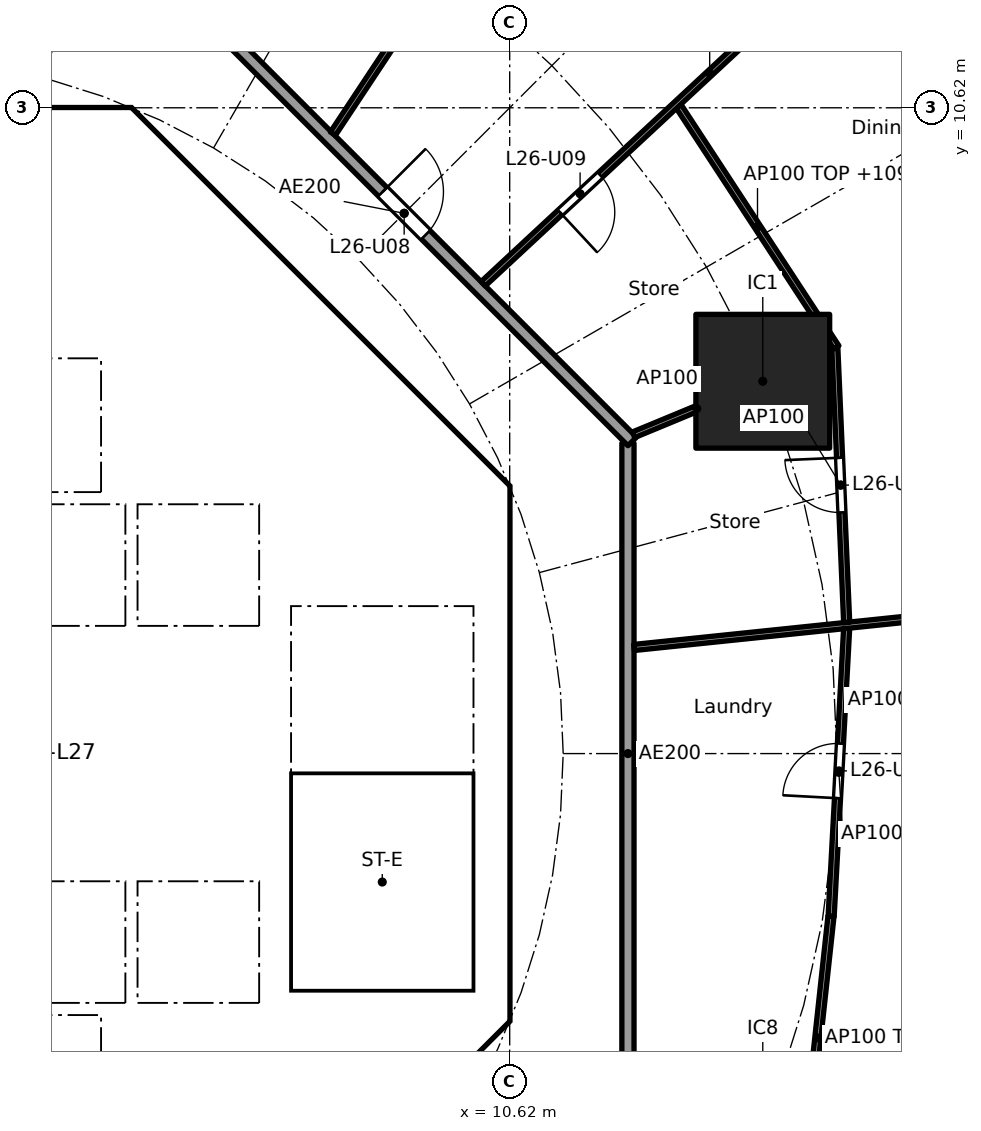
"""IFC4 building model, lengths in metres.
Left out: names, types, materials, properties, quantities, classifications, styles, units other than length and angle.
Written with IfcOpenShell. Run it as: python <this file> out.ifc"""

import sys

from ifc_helpers import new_model, si_unit, direction, frame, frame_2d, origin, origin_2d, place, context, subcontext, project, spatial, polyline, rectangle, outline, extrude, element, fill, save


model = new_model("IFC4")
c1 = context("Model", 3, precision=1e-05, world=origin(), true_north=direction((0.0, 1.0)))
c2 = subcontext(c1, "Body", "Model", "MODEL_VIEW")
j1 = project(units=[si_unit("LENGTHUNIT", "METRE"), si_unit("PLANEANGLEUNIT", "RADIAN")], contexts=[c1])
p1 = place(None, origin())
s1 = spatial("IfcSite", under=j1, at=p1, CompositionType="ELEMENT")
p2 = place(p1, origin())
s2 = spatial("IfcBuilding", under=s1, at=p2, CompositionType="ELEMENT")
p3 = place(p2, frame((0.0, 0.0, 106.6)))
s3 = spatial("IfcBuildingStorey", under=s2, at=p3, CompositionType="ELEMENT", Elevation=106.6)
p4 = place(p3, frame((14.782, 6.123, 0.0), z_axis=(0.0, 0.0, 1.0), x_axis=(1.0, 0.0, 0.0)))
e1 = element("IfcColumn", 1, at=p4, inside=s3, PredefinedType="COLUMN", context=c2, shape_type="SweptSolid", body=[
    extrude(rectangle(XDim=2.2, YDim=2.2, at=origin_2d()), origin(), (0.0, 0.0, 1.0), 3.7),
])
p5 = place(p3, frame((9.988, 4.613, 0.0), z_axis=(0.0, 0.0, 1.0), x_axis=(-0.707106781187, 0.707106781187, 0.0)))
e2 = element("IfcWall", 2, at=p5, inside=s3, PredefinedType="SHEAR", context=c2, shape_type="SweptSolid", body=[
    extrude(rectangle(XDim=7.602, YDim=0.6, at=frame_2d((3.801, 0.0))), origin(), (0.0, 0.0, 1.0), 3.44),
])
p6 = place(p5, frame((3.201, 0.0, 0.0)))
e3 = element("IfcOpeningElement", 3, at=p6, cuts=e2, PredefinedType="OPENING", context=c2, shape_type="SweptSolid", body=[
    extrude(rectangle(XDim=1.2, YDim=2.1, at=frame_2d((0.6, 1.05))), frame((0.0, 0.31, 0.0), z_axis=(0.0, -1.0, 0.0), x_axis=(1.0, 0.0, 0.0)), (0.0, 0.0, 1.0), 0.62),
])
p7 = place(p3, frame((4.613, -9.988, 0.0), z_axis=(0.0, 0.0, 1.0), x_axis=(0.707106781187, 0.707106781187, 0.0)))
e4 = element("IfcWall", 4, at=p7, inside=s3, PredefinedType="SHEAR", context=c2, shape_type="SweptSolid", body=[
    extrude(rectangle(XDim=7.602, YDim=0.6, at=frame_2d((3.801, 0.0))), origin(), (0.0, 0.0, 1.0), 3.44),
])
p8 = place(p7, frame((3.201, 0.0, 0.0)))
e5 = element("IfcOpeningElement", 5, at=p8, cuts=e4, PredefinedType="OPENING", context=c2, shape_type="SweptSolid", body=[
    extrude(rectangle(XDim=1.2, YDim=2.1, at=frame_2d((0.6, 1.05))), frame((0.0, 0.31, 0.0), z_axis=(0.0, -1.0, 0.0), x_axis=(1.0, 0.0, 0.0)), (0.0, 0.0, 1.0), 0.62),
])
p9 = place(p3, frame((4.0, 4.3, 0.0), z_axis=(0.0, 0.0, 1.0), x_axis=(0.0, 1.0, 0.0)))
e6 = element("IfcWall", 6, at=p9, inside=s3, PredefinedType="SOLIDWALL", context=c2, shape_type="SweptSolid", body=[
    extrude(rectangle(XDim=2.2, YDim=0.2, at=frame_2d((1.1, 0.0))), origin(), (0.0, 0.0, 1.0), 3.44),
])
p10 = place(p9, frame((0.55, 0.0, 0.0)))
e7 = element("IfcOpeningElement", 7, at=p10, cuts=e6, PredefinedType="OPENING", context=c2, shape_type="SweptSolid", body=[
    extrude(rectangle(XDim=1.1, YDim=2.1, at=frame_2d((0.55, 1.05))), frame((0.0, 0.11, 0.0), z_axis=(0.0, -1.0, 0.0), x_axis=(1.0, 0.0, 0.0)), (0.0, 0.0, 1.0), 0.22),
])
p11 = place(p3, frame((-6.7, 2.0, 0.0), z_axis=(0.0, 0.0, 1.0), x_axis=(1.0, 0.0, 0.0)))
e8 = element("IfcWall", 8, at=p11, inside=s3, PredefinedType="SOLIDWALL", context=c2, shape_type="SweptSolid", body=[
    extrude(rectangle(XDim=13.4, YDim=0.2, at=frame_2d((6.7, 0.0))), origin(), (0.0, 0.0, 1.0), 3.44),
])
p12 = place(p11, frame((0.65, 0.0, 0.0)))
e9 = element("IfcOpeningElement", 9, at=p12, cuts=e8, PredefinedType="OPENING", context=c2, shape_type="SweptSolid", body=[
    extrude(rectangle(XDim=1.1, YDim=2.1, at=frame_2d((0.55, 1.05))), frame((0.0, 0.11, 0.0), z_axis=(0.0, -1.0, 0.0), x_axis=(1.0, 0.0, 0.0)), (0.0, 0.0, 1.0), 0.22),
])
p13 = place(p11, frame((2.85, 0.0, 0.0)))
e10 = element("IfcOpeningElement", 10, at=p13, cuts=e8, PredefinedType="OPENING", context=c2, shape_type="SweptSolid", body=[
    extrude(rectangle(XDim=1.1, YDim=2.1, at=frame_2d((0.55, 1.05))), frame((0.0, 0.11, 0.0), z_axis=(0.0, -1.0, 0.0), x_axis=(1.0, 0.0, 0.0)), (0.0, 0.0, 1.0), 0.22),
])
p14 = place(p11, frame((5.05, 0.0, 0.0)))
e11 = element("IfcOpeningElement", 11, at=p14, cuts=e8, PredefinedType="OPENING", context=c2, shape_type="SweptSolid", body=[
    extrude(rectangle(XDim=1.1, YDim=2.1, at=frame_2d((0.55, 1.05))), frame((0.0, 0.11, 0.0), z_axis=(0.0, -1.0, 0.0), x_axis=(1.0, 0.0, 0.0)), (0.0, 0.0, 1.0), 0.22),
])
p15 = place(p3, frame((6.7, 4.0, 0.0), z_axis=(0.0, 0.0, 1.0), x_axis=(1.0, 0.0, 0.0)))
e12 = element("IfcWall", 12, at=p15, inside=s3, PredefinedType="SOLIDWALL", context=c2, shape_type="SweptSolid", body=[
    extrude(rectangle(XDim=3.325, YDim=0.2, at=frame_2d((1.662, 0.0))), origin(), (0.0, 0.0, 1.0), 3.44),
])
p16 = place(p15, frame((1.25, 0.0, 0.0)))
e13 = element("IfcOpeningElement", 13, at=p16, cuts=e12, PredefinedType="OPENING", context=c2, shape_type="SweptSolid", body=[
    extrude(rectangle(XDim=1.1, YDim=2.1, at=frame_2d((0.55, 1.05))), frame((0.0, 0.11, 0.0), z_axis=(0.0, -1.0, 0.0), x_axis=(1.0, 0.0, 0.0)), (0.0, 0.0, 1.0), 0.22),
])
p17 = place(p3, frame((4.0, 7.025, 0.0), z_axis=(0.0, 0.0, 1.0), x_axis=(0.0, 1.0, 0.0)))
e14 = element("IfcWall", 14, at=p17, inside=s3, PredefinedType="SOLIDWALL", context=c2, shape_type="SweptSolid", body=[
    extrude(rectangle(XDim=3.0, YDim=0.2, at=frame_2d((1.5, 0.0))), origin(), (0.0, 0.0, 1.0), 3.44),
])
p18 = place(p17, frame((0.925, 0.0, 0.0)))
e15 = element("IfcOpeningElement", 15, at=p18, cuts=e14, PredefinedType="OPENING", context=c2, shape_type="SweptSolid", body=[
    extrude(rectangle(XDim=1.1, YDim=2.1, at=frame_2d((0.55, 1.05))), frame((0.0, 0.11, 0.0), z_axis=(0.0, -1.0, 0.0), x_axis=(1.0, 0.0, 0.0)), (0.0, 0.0, 1.0), 0.22),
])
p19 = place(p3, frame((4.0, -6.5, 0.0), z_axis=(0.0, 0.0, 1.0), x_axis=(0.0, 1.0, 0.0)))
e16 = element("IfcWall", 16, at=p19, inside=s3, PredefinedType="SOLIDWALL", context=c2, shape_type="SweptSolid", body=[
    extrude(rectangle(XDim=2.2, YDim=0.2, at=frame_2d((1.1, 0.0))), origin(), (0.0, 0.0, 1.0), 3.44),
])
p20 = place(p19, frame((0.55, 0.0, 0.0)))
e17 = element("IfcOpeningElement", 17, at=p20, cuts=e16, PredefinedType="OPENING", context=c2, shape_type="SweptSolid", body=[
    extrude(rectangle(XDim=1.1, YDim=2.1, at=frame_2d((0.55, 1.05))), frame((0.0, 0.11, 0.0), z_axis=(0.0, -1.0, 0.0), x_axis=(1.0, 0.0, 0.0)), (0.0, 0.0, 1.0), 0.22),
])
p21 = place(p3, frame((-6.7, -2.0, 0.0), z_axis=(0.0, 0.0, 1.0), x_axis=(1.0, 0.0, 0.0)))
e18 = element("IfcWall", 18, at=p21, inside=s3, PredefinedType="SOLIDWALL", context=c2, shape_type="SweptSolid", body=[
    extrude(rectangle(XDim=13.4, YDim=0.2, at=frame_2d((6.7, 0.0))), origin(), (0.0, 0.0, 1.0), 3.44),
])
p22 = place(p21, frame((0.65, 0.0, 0.0)))
e19 = element("IfcOpeningElement", 19, at=p22, cuts=e18, PredefinedType="OPENING", context=c2, shape_type="SweptSolid", body=[
    extrude(rectangle(XDim=1.1, YDim=2.1, at=frame_2d((0.55, 1.05))), frame((0.0, 0.11, 0.0), z_axis=(0.0, -1.0, 0.0), x_axis=(1.0, 0.0, 0.0)), (0.0, 0.0, 1.0), 0.22),
])
p23 = place(p21, frame((2.85, 0.0, 0.0)))
e20 = element("IfcOpeningElement", 20, at=p23, cuts=e18, PredefinedType="OPENING", context=c2, shape_type="SweptSolid", body=[
    extrude(rectangle(XDim=1.1, YDim=2.1, at=frame_2d((0.55, 1.05))), frame((0.0, 0.11, 0.0), z_axis=(0.0, -1.0, 0.0), x_axis=(1.0, 0.0, 0.0)), (0.0, 0.0, 1.0), 0.22),
])
p24 = place(p3, origin())
e21 = element("IfcWall", 21, at=p24, inside=s3, PredefinedType="SHEAR", context=c2, shape_type="SweptSolid", body=[
    extrude(outline(polyline([(-4.152, 10.025), (-4.401, 9.776), (-4.825, 10.2), (-4.401, 10.625), (4.401, 10.625), (4.825, 10.2), (4.401, 9.776), (4.152, 10.025), (-4.152, 10.025)])), origin(), (0.0, 0.0, 1.0), 3.44),
])
p25 = place(p3, origin())
e22 = element("IfcWall", 22, at=p25, inside=s3, PredefinedType="SHEAR", context=c2, shape_type="SweptSolid", body=[
    extrude(outline(polyline([(9.776, -4.401), (10.025, -4.152), (10.025, -3.801), (10.025, 4.152), (9.776, 4.401), (10.2, 4.825), (10.625, 4.401), (10.625, -4.401), (10.2, -4.825), (9.776, -4.401)])), origin(), (0.0, 0.0, 1.0), 3.44),
])
p26 = place(p3, origin())
e23 = element("IfcWall", 23, at=p26, inside=s3, PredefinedType="SOLIDWALL", context=c2, shape_type="SweptSolid", body=[
    extrude(outline(polyline([(-6.7, -2.1), (-6.5, -2.1), (-6.5, -4.1), (-4.5, -4.1), (-4.5, -2.1), (-4.3, -2.1), (-4.3, -4.1), (-2.3, -4.1), (-2.3, -2.1), (-2.1, -2.1), (-2.1, -4.1), (-0.1, -4.1), (-0.1, -2.1), (0.1, -2.1), (0.1, -4.1), (2.1, -4.1), (2.1, -2.1), (2.3, -2.1), (2.3, -4.1), (4.3, -4.1), (4.3, -2.1), (4.5, -2.1), (4.5, -4.1), (6.5, -4.1), (6.5, -2.1), (6.7, -2.1), (6.7, -4.3), (-6.7, -4.3), (-6.7, -2.1)])), origin(), (0.0, 0.0, 1.0), 3.44),
])
p27 = place(p3, origin())
e24 = element("IfcWall", 24, at=p27, inside=s3, PredefinedType="SOLIDWALL", context=c2, shape_type="SweptSolid", body=[
    extrude(outline(polyline([(-6.5, 2.1), (-6.7, 2.1), (-6.7, 4.3), (6.7, 4.3), (6.7, 2.1), (6.5, 2.1), (6.5, 4.1), (4.5, 4.1), (4.5, 2.1), (4.3, 2.1), (4.3, 4.1), (2.3, 4.1), (2.3, 2.1), (2.1, 2.1), (2.1, 4.1), (0.1, 4.1), (0.1, 2.1), (-0.1, 2.1), (-0.1, 4.1), (-2.1, 4.1), (-2.1, 2.1), (-2.3, 2.1), (-2.3, 4.1), (-4.3, 4.1), (-4.3, 2.1), (-4.5, 2.1), (-4.5, 4.1), (-6.5, 4.1), (-6.5, 2.1)])), origin(), (0.0, 0.0, 1.0), 3.44),
])
p28 = place(p3, origin())
e25 = element("IfcWall", 25, at=p28, inside=s3, PredefinedType="SOLIDWALL", context=c2, shape_type="SweptSolid", body=[
    extrude(outline(polyline([(4.1, 6.5), (-4.1, 6.5), (-4.1, 7.025), (4.1, 7.025), (4.1, 6.5)])), origin(), (0.0, 0.0, 1.0), 3.44),
])
p29 = place(p3, origin())
e26 = element("IfcWall", 26, at=p29, inside=s3, PredefinedType="SOLIDWALL", context=c2, shape_type="SweptSolid", body=[
    extrude(outline(polyline([(7.025, -3.9), (6.7, -3.9), (6.7, 3.9), (7.025, 3.9), (7.025, -3.9)])), origin(), (0.0, 0.0, 1.0), 3.44),
])
p30 = place(p3, origin())
e27 = element("IfcWall", 27, at=p30, inside=s3, PredefinedType="SOLIDWALL", context=c2, shape_type="SweptSolid", body=[
    extrude(outline(polyline([(10.025, -4.1), (6.7, -4.1), (6.7, -3.9), (10.025, -3.9), (10.025, -4.1)])), origin(), (0.0, 0.0, 1.0), 3.44),
])
p31 = place(p3, frame((12.565, -5.104, 0.0), z_axis=(0.0, 0.0, 1.0), x_axis=(0.0, 1.0, 0.0)))
e28 = element("IfcWall", 28, at=p31, inside=s3, PredefinedType="PARTITIONING", context=c2, shape_type="SweptSolid", body=[
    extrude(rectangle(XDim=10.209, YDim=0.2, at=frame_2d((5.104, 0.0))), origin(), (0.0, 0.0, 1.0), 3.44),
])
p32 = place(p3, frame((12.635, 5.134, 0.0), z_axis=(0.0, 0.0, 1.0), x_axis=(-0.707106781187, 0.707106781187, 0.0)))
e29 = element("IfcWall", 29, at=p32, inside=s3, PredefinedType="PARTITIONING", context=c2, shape_type="SweptSolid", body=[
    extrude(rectangle(XDim=10.609, YDim=0.2, at=frame_2d((5.305, 0.0))), origin(), (0.0, 0.0, 1.0), 3.44),
])
p33 = place(p32, frame((4.804, 0.0, 0.0)))
e30 = element("IfcOpeningElement", 30, at=p33, cuts=e29, PredefinedType="OPENING", context=c2, shape_type="SweptSolid", body=[
    extrude(rectangle(XDim=1.0, YDim=2.1, at=frame_2d((0.5, 1.05))), frame((0.0, 0.11, 0.0), z_axis=(0.0, -1.0, 0.0), x_axis=(1.0, 0.0, 0.0)), (0.0, 0.0, 1.0), 0.22),
])
p34 = place(p3, frame((12.664, 1.745, 0.0), z_axis=(0.0, 0.0, 1.0), x_axis=(0.994662790212, 0.103179134358, 0.0)))
e31 = element("IfcWall", 31, at=p34, inside=s3, PredefinedType="PARTITIONING", context=c2, shape_type="SweptSolid", body=[
    extrude(rectangle(XDim=12.257, YDim=0.1, at=frame_2d((6.128, 0.0))), origin(), (0.0, 0.0, 1.0), 2.687),
])
p35 = place(p34, frame((5.414, 0.0, 0.0)))
e32 = element("IfcOpeningElement", 32, at=p35, cuts=e31, PredefinedType="OPENING", context=c2, shape_type="SweptSolid", body=[
    extrude(rectangle(XDim=0.9, YDim=2.1, at=frame_2d((0.45, 1.05))), frame((0.0, 0.06, 0.0), z_axis=(0.0, -1.0, 0.0), x_axis=(1.0, 0.0, 0.0)), (0.0, 0.0, 1.0), 0.12),
])
p36 = place(p3, frame((16.162, 2.158, 0.0), z_axis=(0.0, 0.0, 1.0), x_axis=(-0.043120653248, 0.999069872063, 0.0)))
e33 = element("IfcWall", 33, at=p36, inside=s3, PredefinedType="PARTITIONING", context=c2, shape_type="SweptSolid", body=[
    extrude(rectangle(XDim=4.518, YDim=0.1, at=frame_2d((2.259, 0.0))), origin(), (0.0, 0.0, 1.0), 3.44),
])
p37 = place(p36, frame((1.809, 0.0, 0.0)))
e34 = element("IfcOpeningElement", 34, at=p37, cuts=e33, PredefinedType="OPENING", context=c2, shape_type="SweptSolid", body=[
    extrude(rectangle(XDim=0.9, YDim=2.1, at=frame_2d((0.45, 1.05))), frame((0.0, 0.06, 0.0), z_axis=(0.0, -1.0, 0.0), x_axis=(1.0, 0.0, 0.0)), (0.0, 0.0, 1.0), 0.12),
])
p38 = place(p3, frame((16.161, 2.058, 0.0), z_axis=(0.0, 0.0, 1.0), x_axis=(-0.053696394729, -0.998557307916, 0.0)))
e35 = element("IfcWall", 35, at=p38, inside=s3, PredefinedType="PARTITIONING", context=c2, shape_type="SweptSolid", body=[
    extrude(rectangle(XDim=4.742, YDim=0.1, at=frame_2d((2.371, 0.0))), origin(), (0.0, 0.0, 1.0), 2.762),
])
p39 = place(p38, frame((1.896, 0.0, 0.0)))
e36 = element("IfcOpeningElement", 36, at=p39, cuts=e35, PredefinedType="OPENING", context=c2, shape_type="SweptSolid", body=[
    extrude(rectangle(XDim=0.9, YDim=2.1, at=frame_2d((0.45, 1.05))), frame((0.0, 0.06, 0.0), z_axis=(0.0, -1.0, 0.0), x_axis=(1.0, 0.0, 0.0)), (0.0, 0.0, 1.0), 0.12),
])
p40 = place(p3, frame((12.657, 5.243, 0.0), z_axis=(0.0, 0.0, 1.0), x_axis=(0.923864733477, 0.382719158442, 0.0)))
e37 = element("IfcWall", 37, at=p40, inside=s3, PredefinedType="PARTITIONING", context=c2, shape_type="SweptSolid", body=[
    extrude(rectangle(XDim=2.25, YDim=0.1, at=frame_2d((1.125, 0.0))), origin(), (0.0, 0.0, 1.0), 3.44),
])
p41 = place(p3, frame((15.992, 6.68, 0.0), z_axis=(0.0, 0.0, 1.0), x_axis=(-0.547472878942, 0.836823426311, 0.0)))
e38 = element("IfcWall", 38, at=p41, inside=s3, PredefinedType="PARTITIONING", context=c2, shape_type="SweptSolid", body=[
    extrude(rectangle(XDim=4.738, YDim=0.1, at=frame_2d((2.369, 0.0))), origin(), (0.0, 0.0, 1.0), 2.762),
])
p42 = place(p3, frame((10.185, 7.726, 0.0), z_axis=(0.0, 0.0, 1.0), x_axis=(0.732598472978, 0.680661059112, 0.0)))
e39 = element("IfcWall", 39, at=p42, inside=s3, PredefinedType="PARTITIONING", context=c2, shape_type="SweptSolid", body=[
    extrude(rectangle(XDim=10.167, YDim=0.1, at=frame_2d((5.084, 0.0))), origin(), (0.0, 0.0, 1.0), 2.687),
])
p43 = place(p42, frame((1.725, 0.0, 0.0)))
e40 = element("IfcOpeningElement", 40, at=p43, cuts=e39, PredefinedType="OPENING", context=c2, shape_type="SweptSolid", body=[
    extrude(rectangle(XDim=0.9, YDim=2.1, at=frame_2d((0.45, 1.05))), frame((0.0, 0.06, 0.0), z_axis=(0.0, -1.0, 0.0), x_axis=(1.0, 0.0, 0.0)), (0.0, 0.0, 1.0), 0.12),
])
p44 = place(p42, frame((6.784, 0.0, 0.0)))
e41 = element("IfcOpeningElement", 41, at=p44, cuts=e39, PredefinedType="OPENING", context=c2, shape_type="SweptSolid", body=[
    extrude(rectangle(XDim=0.9, YDim=2.1, at=frame_2d((0.45, 1.05))), frame((0.0, 0.06, 0.0), z_axis=(0.0, -1.0, 0.0), x_axis=(1.0, 0.0, 0.0)), (0.0, 0.0, 1.0), 0.12),
])
p45 = place(p3, frame((7.713, 10.195, 0.0), z_axis=(0.0, 0.0, 1.0), x_axis=(0.552111071171, 0.833770571015, 0.0)))
e42 = element("IfcWall", 42, at=p45, inside=s3, PredefinedType="PARTITIONING", context=c2, shape_type="SweptSolid", body=[
    extrude(rectangle(XDim=17.208, YDim=0.1, at=frame_2d((8.604, 0.0))), origin(), (0.0, 0.0, 1.0), 2.687),
])
p46 = place(p45, frame((1.976, 0.0, 0.0)))
e43 = element("IfcOpeningElement", 43, at=p46, cuts=e42, PredefinedType="OPENING", context=c2, shape_type="SweptSolid", body=[
    extrude(rectangle(XDim=0.9, YDim=2.1, at=frame_2d((0.45, 1.05))), frame((0.0, 0.06, 0.0), z_axis=(0.0, -1.0, 0.0), x_axis=(1.0, 0.0, 0.0)), (0.0, 0.0, 1.0), 0.12),
])
p47 = place(p45, frame((7.611, 0.0, 0.0)))
e44 = element("IfcOpeningElement", 44, at=p47, cuts=e42, PredefinedType="OPENING", context=c2, shape_type="SweptSolid", body=[
    extrude(rectangle(XDim=0.9, YDim=2.1, at=frame_2d((0.45, 1.05))), frame((0.0, 0.06, 0.0), z_axis=(0.0, -1.0, 0.0), x_axis=(1.0, 0.0, 0.0)), (0.0, 0.0, 1.0), 0.12),
])
p48 = place(p45, frame((13.79, 0.0, 0.0)))
e45 = element("IfcOpeningElement", 45, at=p48, cuts=e42, PredefinedType="OPENING", context=c2, shape_type="SweptSolid", body=[
    extrude(rectangle(XDim=0.9, YDim=2.1, at=frame_2d((0.45, 1.05))), frame((0.0, 0.06, 0.0), z_axis=(0.0, -1.0, 0.0), x_axis=(1.0, 0.0, 0.0)), (0.0, 0.0, 1.0), 0.12),
])
p49 = place(p3, frame((15.471, -6.675, 0.0), z_axis=(0.0, 0.0, 1.0), x_axis=(0.107572661837, 0.994197225114, 0.0)))
e46 = element("IfcWall", 46, at=p49, inside=s3, PredefinedType="PARTITIONING", context=c2, shape_type="SweptSolid", body=[
    extrude(rectangle(XDim=4.022, YDim=0.1, at=frame_2d((2.011, 0.0))), origin(), (0.0, 0.0, 1.0), 2.762),
])
p50 = place(p10, origin())
e47 = element("IfcDoor", 47, at=p50, inside=s3, OperationType="DOUBLE_DOOR_SLIDING", PredefinedType="DOOR", context=c2, shape_type="SweptSolid", body=[
    extrude(rectangle(XDim=1.1, YDim=2.1, at=frame_2d((0.55, 1.05))), frame((0.0, 0.025, 0.0), z_axis=(0.0, -1.0, 0.0), x_axis=(1.0, 0.0, 0.0)), (0.0, 0.0, 1.0), 0.05),
])
fill(e7, e47)
p51 = place(p20, origin())
e48 = element("IfcDoor", 48, at=p51, inside=s3, OperationType="DOUBLE_DOOR_SLIDING", PredefinedType="DOOR", context=c2, shape_type="SweptSolid", body=[
    extrude(rectangle(XDim=1.1, YDim=2.1, at=frame_2d((0.55, 1.05))), frame((0.0, 0.025, 0.0), z_axis=(0.0, -1.0, 0.0), x_axis=(1.0, 0.0, 0.0)), (0.0, 0.0, 1.0), 0.05),
])
fill(e17, e48)
p52 = place(p16, frame((1.1, 0.0, 0.0), x_axis=(-1.0, 0.0, 0.0)))
e49 = element("IfcDoor", 49, at=p52, inside=s3, OperationType="SINGLE_SWING_RIGHT", PredefinedType="DOOR", context=c2, shape_type="SweptSolid", body=[
    extrude(rectangle(XDim=1.1, YDim=2.1, at=frame_2d((0.55, 1.05))), frame((0.0, 0.025, 0.0), z_axis=(0.0, -1.0, 0.0), x_axis=(1.0, 0.0, 0.0)), (0.0, 0.0, 1.0), 0.05),
])
fill(e13, e49)
p53 = place(p18, origin())
e50 = element("IfcDoor", 50, at=p53, inside=s3, OperationType="SINGLE_SWING_LEFT", PredefinedType="DOOR", context=c2, shape_type="SweptSolid", body=[
    extrude(rectangle(XDim=1.1, YDim=2.1, at=frame_2d((0.55, 1.05))), frame((0.0, 0.025, 0.0), z_axis=(0.0, -1.0, 0.0), x_axis=(1.0, 0.0, 0.0)), (0.0, 0.0, 1.0), 0.05),
])
fill(e15, e50)
p54 = place(p6, origin())
e51 = element("IfcDoor", 51, at=p54, inside=s3, OperationType="SINGLE_SWING_RIGHT", PredefinedType="DOOR", context=c2, shape_type="SweptSolid", body=[
    extrude(rectangle(XDim=1.2, YDim=2.1, at=frame_2d((0.6, 1.05))), frame((0.0, 0.025, 0.0), z_axis=(0.0, -1.0, 0.0), x_axis=(1.0, 0.0, 0.0)), (0.0, 0.0, 1.0), 0.05),
])
fill(e3, e51)
p55 = place(p33, frame((1.0, 0.0, 0.0), x_axis=(-1.0, 0.0, 0.0)))
e52 = element("IfcDoor", 52, at=p55, inside=s3, OperationType="SINGLE_SWING_LEFT", PredefinedType="DOOR", context=c2, shape_type="SweptSolid", body=[
    extrude(rectangle(XDim=1.0, YDim=2.1, at=frame_2d((0.5, 1.05))), frame((0.0, 0.025, 0.0), z_axis=(0.0, -1.0, 0.0), x_axis=(1.0, 0.0, 0.0)), (0.0, 0.0, 1.0), 0.05),
])
fill(e30, e52)
p56 = place(p43, frame((0.9, 0.0, 0.0), x_axis=(-1.0, 0.0, 0.0)))
e53 = element("IfcDoor", 53, at=p56, inside=s3, OperationType="SINGLE_SWING_RIGHT", PredefinedType="DOOR", context=c2, shape_type="SweptSolid", body=[
    extrude(rectangle(XDim=0.9, YDim=2.1, at=frame_2d((0.45, 1.05))), frame((0.0, 0.025, 0.0), z_axis=(0.0, -1.0, 0.0), x_axis=(1.0, 0.0, 0.0)), (0.0, 0.0, 1.0), 0.05),
])
fill(e40, e53)
p57 = place(p37, origin())
e54 = element("IfcDoor", 54, at=p57, inside=s3, OperationType="SINGLE_SWING_RIGHT", PredefinedType="DOOR", context=c2, shape_type="SweptSolid", body=[
    extrude(rectangle(XDim=0.9, YDim=2.1, at=frame_2d((0.45, 1.05))), frame((0.0, 0.025, 0.0), z_axis=(0.0, -1.0, 0.0), x_axis=(1.0, 0.0, 0.0)), (0.0, 0.0, 1.0), 0.05),
])
fill(e34, e54)
p58 = place(p39, frame((0.9, 0.0, 0.0), x_axis=(-1.0, 0.0, 0.0)))
e55 = element("IfcDoor", 55, at=p58, inside=s3, OperationType="SINGLE_SWING_LEFT", PredefinedType="DOOR", context=c2, shape_type="SweptSolid", body=[
    extrude(rectangle(XDim=0.9, YDim=2.1, at=frame_2d((0.45, 1.05))), frame((0.0, 0.025, 0.0), z_axis=(0.0, -1.0, 0.0), x_axis=(1.0, 0.0, 0.0)), (0.0, 0.0, 1.0), 0.05),
])
fill(e36, e55)
save(model, sys.argv[1])
